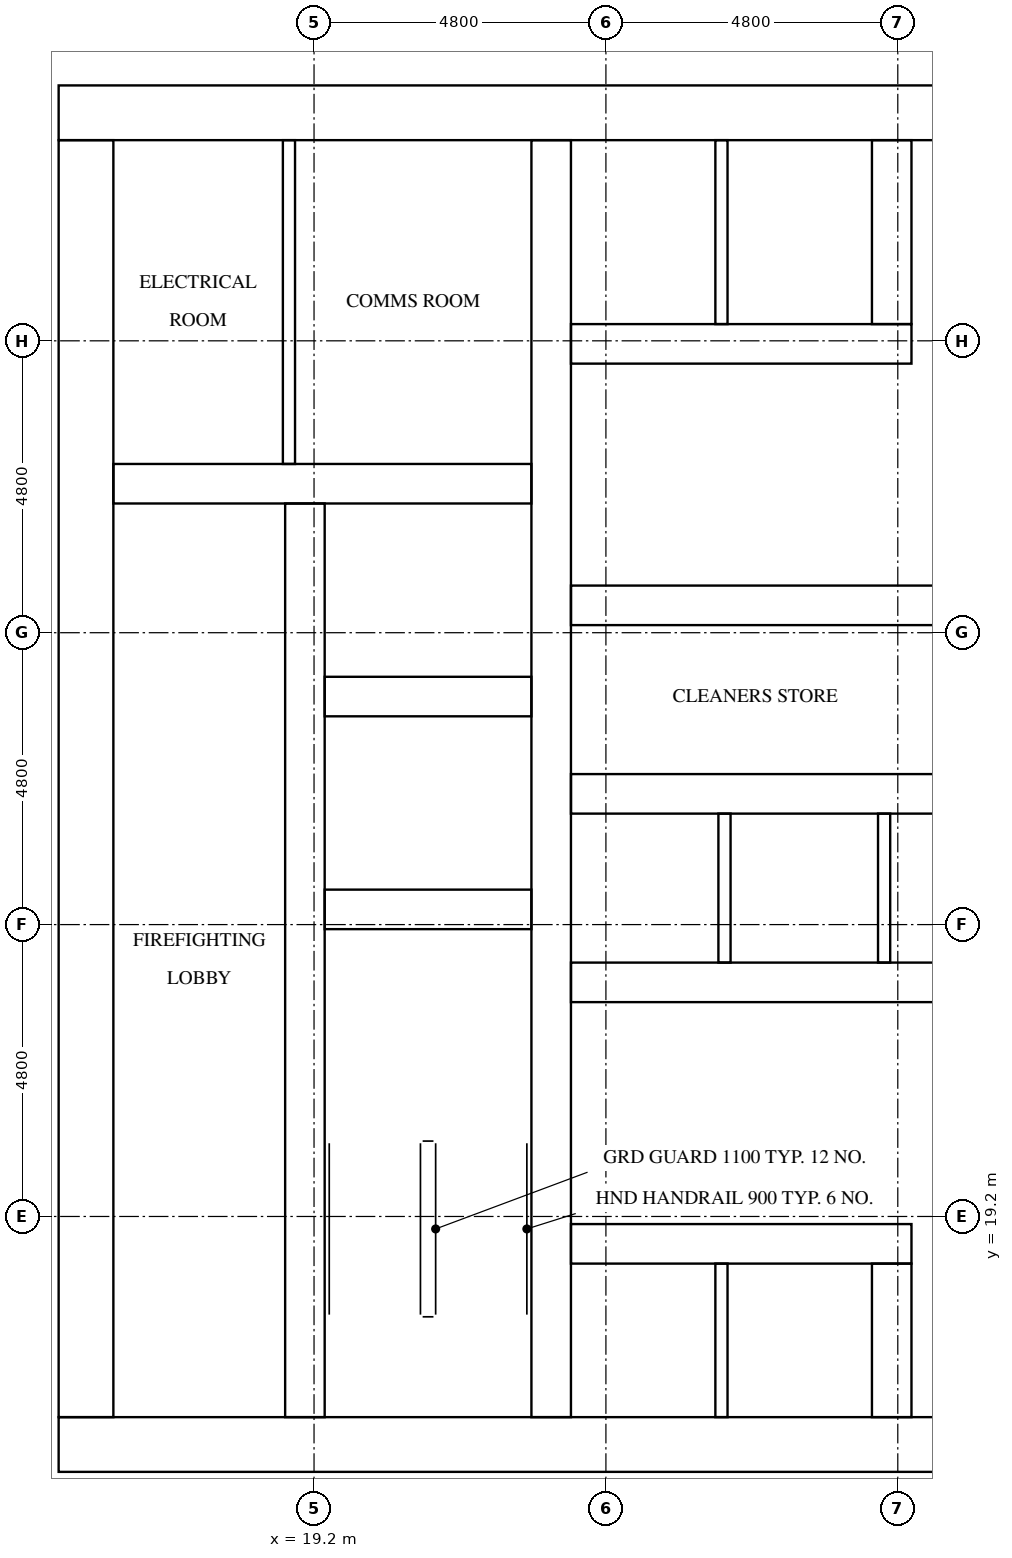
"""IFC4 building model, lengths in metres.
Left out: names, types, materials, properties, quantities, classifications, styles, units other than length and angle.
Written with IfcOpenShell. Run it as: python <this file> out.ifc"""

import sys

from ifc_helpers import new_model, si_unit, direction, frame, frame_2d, origin, place, context, subcontext, project, spatial, rectangle, extrude, element, fill, save


model = new_model("IFC4")
c1 = context("Model", 3, precision=1e-05, world=origin(), true_north=direction((0.0, 1.0)))
c2 = subcontext(c1, "Body", "Model", "MODEL_VIEW")
j1 = project(units=[si_unit("LENGTHUNIT", "METRE"), si_unit("PLANEANGLEUNIT", "RADIAN")], contexts=[c1])
p1 = place(None, origin())
s1 = spatial("IfcSite", under=j1, at=p1, CompositionType="ELEMENT")
p2 = place(p1, origin())
s2 = spatial("IfcBuilding", under=s1, at=p2, CompositionType="ELEMENT")
p3 = place(p2, frame((0.0, 0.0, 76.8)))
s3 = spatial("IfcBuildingStorey", under=s2, at=p3, CompositionType="ELEMENT", Elevation=76.8)
p4 = place(p3, frame((15.0, 15.45, 0.0), z_axis=(0.0, 0.0, 1.0), x_axis=(1.0, 0.0, 0.0)))
e1 = element("IfcWall", 1, at=p4, inside=s3, PredefinedType="SHEAR", context=c2, shape_type="SweptSolid", body=[
    extrude(rectangle(XDim=32.4, YDim=0.9, at=frame_2d((16.2, 0.0))), origin(), (0.0, 0.0, 1.0), 3.2),
])
p5 = place(p4, frame((15.3, 0.0, 0.0)))
e2 = element("IfcOpeningElement", 2, at=p5, cuts=e1, PredefinedType="OPENING", context=c2, shape_type="SweptSolid", body=[
    extrude(rectangle(XDim=1.8, YDim=2.1, at=frame_2d((0.9, 1.05))), frame((0.0, 0.46, 0.0), z_axis=(0.0, -1.0, 0.0), x_axis=(1.0, 0.0, 0.0)), (0.0, 0.0, 1.0), 0.92),
])
p6 = place(p3, frame((15.0, 37.35, 0.0), z_axis=(0.0, 0.0, 1.0), x_axis=(1.0, 0.0, 0.0)))
e3 = element("IfcWall", 3, at=p6, inside=s3, PredefinedType="SHEAR", context=c2, shape_type="SweptSolid", body=[
    extrude(rectangle(XDim=32.4, YDim=0.9, at=frame_2d((16.2, 0.0))), origin(), (0.0, 0.0, 1.0), 3.2),
])
p7 = place(p6, frame((15.3, 0.0, 0.0)))
e4 = element("IfcOpeningElement", 4, at=p7, cuts=e3, PredefinedType="OPENING", context=c2, shape_type="SweptSolid", body=[
    extrude(rectangle(XDim=1.8, YDim=2.1, at=frame_2d((0.9, 1.05))), frame((0.0, 0.46, 0.0), z_axis=(0.0, -1.0, 0.0), x_axis=(1.0, 0.0, 0.0)), (0.0, 0.0, 1.0), 0.92),
])
p8 = place(p6, frame((1.794, 0.0, 0.0)))
e5 = element("IfcOpeningElement", 5, at=p8, cuts=e3, PredefinedType="OPENING", context=c2, shape_type="SweptSolid", body=[
    extrude(rectangle(XDim=1.0, YDim=2.1, at=frame_2d((0.5, 1.05))), frame((0.0, 0.46, 0.0), z_axis=(0.0, -1.0, 0.0), x_axis=(1.0, 0.0, 0.0)), (0.0, 0.0, 1.0), 0.92),
])
p9 = place(p6, frame((5.331, 0.0, 0.0)))
e6 = element("IfcOpeningElement", 6, at=p9, cuts=e3, PredefinedType="OPENING", context=c2, shape_type="SweptSolid", body=[
    extrude(rectangle(XDim=1.0, YDim=2.1, at=frame_2d((0.5, 1.05))), frame((0.0, 0.46, 0.0), z_axis=(0.0, -1.0, 0.0), x_axis=(1.0, 0.0, 0.0)), (0.0, 0.0, 1.0), 0.92),
])
p10 = place(p3, frame((15.45, 15.9, 0.0), z_axis=(0.0, 0.0, 1.0), x_axis=(0.0, 1.0, 0.0)))
e7 = element("IfcWall", 7, at=p10, inside=s3, PredefinedType="SHEAR", context=c2, shape_type="SweptSolid", body=[
    extrude(rectangle(XDim=21.0, YDim=0.9, at=frame_2d((10.5, 0.0))), origin(), (0.0, 0.0, 1.0), 3.2),
])
p11 = place(p10, frame((4.86, 0.0, 0.0)))
e8 = element("IfcOpeningElement", 8, at=p11, cuts=e7, PredefinedType="OPENING", context=c2, shape_type="SweptSolid", body=[
    extrude(rectangle(XDim=1.2, YDim=2.1, at=frame_2d((0.6, 1.05))), frame((0.0, 0.46, 0.0), z_axis=(0.0, -1.0, 0.0), x_axis=(1.0, 0.0, 0.0)), (0.0, 0.0, 1.0), 0.92),
])
p12 = place(p3, frame((19.05, 15.9, 0.0), z_axis=(0.0, 0.0, 1.0), x_axis=(0.0, 1.0, 0.0)))
e9 = element("IfcWall", 9, at=p12, inside=s3, PredefinedType="SHEAR", context=c2, shape_type="SweptSolid", body=[
    extrude(rectangle(XDim=15.025, YDim=0.65, at=frame_2d((7.513, 0.0))), origin(), (0.0, 0.0, 1.0), 3.2),
])
p13 = place(p12, frame((9.55, 0.0, 0.0)))
e10 = element("IfcOpeningElement", 10, at=p13, cuts=e9, PredefinedType="OPENING", context=c2, shape_type="SweptSolid", body=[
    extrude(rectangle(XDim=1.1, YDim=2.1, at=frame_2d((0.55, 1.05))), frame((0.0, 0.335, 0.0), z_axis=(0.0, -1.0, 0.0), x_axis=(1.0, 0.0, 0.0)), (0.0, 0.0, 1.0), 0.67),
])
p14 = place(p12, frame((13.05, 0.0, 0.0)))
e11 = element("IfcOpeningElement", 11, at=p14, cuts=e9, PredefinedType="OPENING", context=c2, shape_type="SweptSolid", body=[
    extrude(rectangle(XDim=1.1, YDim=2.1, at=frame_2d((0.55, 1.05))), frame((0.0, 0.335, 0.0), z_axis=(0.0, -1.0, 0.0), x_axis=(1.0, 0.0, 0.0)), (0.0, 0.0, 1.0), 0.67),
])
p15 = place(p12, frame((0.3, 0.0, 0.0)))
e12 = element("IfcOpeningElement", 12, at=p15, cuts=e9, PredefinedType="OPENING", context=c2, shape_type="SweptSolid", body=[
    extrude(rectangle(XDim=1.2, YDim=2.1, at=frame_2d((0.6, 1.05))), frame((0.0, 0.335, 0.0), z_axis=(0.0, -1.0, 0.0), x_axis=(1.0, 0.0, 0.0)), (0.0, 0.0, 1.0), 0.67),
])
p16 = place(p3, frame((23.1, 15.9, 0.0), z_axis=(0.0, 0.0, 1.0), x_axis=(0.0, 1.0, 0.0)))
e13 = element("IfcWall", 13, at=p16, inside=s3, PredefinedType="SHEAR", context=c2, shape_type="SweptSolid", body=[
    extrude(rectangle(XDim=21.0, YDim=0.65, at=frame_2d((10.5, 0.0))), origin(), (0.0, 0.0, 1.0), 3.2),
])
for number, where, z_axis, x_axis in (
    (14, (19.375, 24.25, 0.0), (0.0, 0.0, 1.0), (1.0, 0.0, 0.0)),
    (15, (19.375, 27.75, 0.0), (0.0, 0.0, 1.0), (1.0, 0.0, 0.0)),
):
    element("IfcWall", number, at=place(p3, frame(where, z_axis=z_axis, x_axis=x_axis)), inside=s3, PredefinedType="SHEAR", context=c2, shape_type="SweptSolid", body=[
        extrude(rectangle(XDim=3.4, YDim=0.65, at=frame_2d((1.7, 0.0))), origin(), (0.0, 0.0, 1.0), 3.2),
    ])
p17 = place(p3, frame((15.9, 31.25, 0.0), z_axis=(0.0, 0.0, 1.0), x_axis=(1.0, 0.0, 0.0)))
e16 = element("IfcWall", 16, at=p17, inside=s3, PredefinedType="SHEAR", context=c2, shape_type="SweptSolid", body=[
    extrude(rectangle(XDim=6.875, YDim=0.65, at=frame_2d((3.438, 0.0))), origin(), (0.0, 0.0, 1.0), 3.2),
])
p18 = place(p3, frame((23.425, 18.75, 0.0), z_axis=(0.0, 0.0, 1.0), x_axis=(1.0, 0.0, 0.0)))
e17 = element("IfcWall", 17, at=p18, inside=s3, PredefinedType="SHEAR", context=c2, shape_type="SweptSolid", body=[
    extrude(rectangle(XDim=5.6, YDim=0.65, at=frame_2d((2.8, 0.0))), origin(), (0.0, 0.0, 1.0), 3.2),
])
p19 = place(p18, frame((0.637, 0.0, 0.0)))
e18 = element("IfcOpeningElement", 18, at=p19, cuts=e17, PredefinedType="OPENING", context=c2, shape_type="SweptSolid", body=[
    extrude(rectangle(XDim=1.1, YDim=2.1, at=frame_2d((0.55, 1.05))), frame((0.0, 0.335, 0.0), z_axis=(0.0, -1.0, 0.0), x_axis=(1.0, 0.0, 0.0)), (0.0, 0.0, 1.0), 0.67),
])
p20 = place(p18, frame((3.212, 0.0, 0.0)))
e19 = element("IfcOpeningElement", 19, at=p20, cuts=e17, PredefinedType="OPENING", context=c2, shape_type="SweptSolid", body=[
    extrude(rectangle(XDim=1.1, YDim=2.1, at=frame_2d((0.55, 1.05))), frame((0.0, 0.335, 0.0), z_axis=(0.0, -1.0, 0.0), x_axis=(1.0, 0.0, 0.0)), (0.0, 0.0, 1.0), 0.67),
])
p21 = place(p3, frame((23.425, 23.05, 0.0), z_axis=(0.0, 0.0, 1.0), x_axis=(1.0, 0.0, 0.0)))
e20 = element("IfcWall", 20, at=p21, inside=s3, PredefinedType="SHEAR", context=c2, shape_type="SweptSolid", body=[
    extrude(rectangle(XDim=15.55, YDim=0.65, at=frame_2d((7.775, 0.0))), origin(), (0.0, 0.0, 1.0), 3.2),
])
p22 = place(p21, frame((0.663, 0.0, 0.0)))
e21 = element("IfcOpeningElement", 21, at=p22, cuts=e20, PredefinedType="OPENING", context=c2, shape_type="SweptSolid", body=[
    extrude(rectangle(XDim=1.1, YDim=2.1, at=frame_2d((0.55, 1.05))), frame((0.0, 0.335, 0.0), z_axis=(0.0, -1.0, 0.0), x_axis=(1.0, 0.0, 0.0)), (0.0, 0.0, 1.0), 0.67),
])
p23 = place(p21, frame((3.288, 0.0, 0.0)))
e22 = element("IfcOpeningElement", 22, at=p23, cuts=e20, PredefinedType="OPENING", context=c2, shape_type="SweptSolid", body=[
    extrude(rectangle(XDim=1.1, YDim=2.1, at=frame_2d((0.55, 1.05))), frame((0.0, 0.335, 0.0), z_axis=(0.0, -1.0, 0.0), x_axis=(1.0, 0.0, 0.0)), (0.0, 0.0, 1.0), 0.67),
])
p24 = place(p21, frame((10.809, 0.0, 0.0)))
e23 = element("IfcOpeningElement", 23, at=p24, cuts=e20, PredefinedType="OPENING", context=c2, shape_type="SweptSolid", body=[
    extrude(rectangle(XDim=1.0, YDim=2.1, at=frame_2d((0.5, 1.05))), frame((0.0, 0.335, 0.0), z_axis=(0.0, -1.0, 0.0), x_axis=(1.0, 0.0, 0.0)), (0.0, 0.0, 1.0), 0.67),
])
p25 = place(p21, frame((13.434, 0.0, 0.0)))
e24 = element("IfcOpeningElement", 24, at=p25, cuts=e20, PredefinedType="OPENING", context=c2, shape_type="SweptSolid", body=[
    extrude(rectangle(XDim=1.0, YDim=2.1, at=frame_2d((0.5, 1.05))), frame((0.0, 0.335, 0.0), z_axis=(0.0, -1.0, 0.0), x_axis=(1.0, 0.0, 0.0)), (0.0, 0.0, 1.0), 0.67),
])
p26 = place(p3, frame((23.425, 26.15, 0.0), z_axis=(0.0, 0.0, 1.0), x_axis=(1.0, 0.0, 0.0)))
e25 = element("IfcWall", 25, at=p26, inside=s3, PredefinedType="SHEAR", context=c2, shape_type="SweptSolid", body=[
    extrude(rectangle(XDim=15.55, YDim=0.65, at=frame_2d((7.775, 0.0))), origin(), (0.0, 0.0, 1.0), 3.2),
])
p27 = place(p3, frame((23.425, 29.25, 0.0), z_axis=(0.0, 0.0, 1.0), x_axis=(1.0, 0.0, 0.0)))
e26 = element("IfcWall", 26, at=p27, inside=s3, PredefinedType="SHEAR", context=c2, shape_type="SweptSolid", body=[
    extrude(rectangle(XDim=15.55, YDim=0.65, at=frame_2d((7.775, 0.0))), origin(), (0.0, 0.0, 1.0), 3.2),
])
p28 = place(p27, frame((2.508, 0.0, 0.0)))
e27 = element("IfcOpeningElement", 27, at=p28, cuts=e26, PredefinedType="OPENING", context=c2, shape_type="SweptSolid", body=[
    extrude(rectangle(XDim=1.0, YDim=2.1, at=frame_2d((0.5, 1.05))), frame((0.0, 0.335, 0.0), z_axis=(0.0, -1.0, 0.0), x_axis=(1.0, 0.0, 0.0)), (0.0, 0.0, 1.0), 0.67),
])
p29 = place(p27, frame((7.275, 0.0, 0.0)))
e28 = element("IfcOpeningElement", 28, at=p29, cuts=e26, PredefinedType="OPENING", context=c2, shape_type="SweptSolid", body=[
    extrude(rectangle(XDim=1.0, YDim=2.1, at=frame_2d((0.5, 1.05))), frame((0.0, 0.335, 0.0), z_axis=(0.0, -1.0, 0.0), x_axis=(1.0, 0.0, 0.0)), (0.0, 0.0, 1.0), 0.67),
])
p30 = place(p27, frame((12.042, 0.0, 0.0)))
e29 = element("IfcOpeningElement", 29, at=p30, cuts=e26, PredefinedType="OPENING", context=c2, shape_type="SweptSolid", body=[
    extrude(rectangle(XDim=1.0, YDim=2.1, at=frame_2d((0.5, 1.05))), frame((0.0, 0.335, 0.0), z_axis=(0.0, -1.0, 0.0), x_axis=(1.0, 0.0, 0.0)), (0.0, 0.0, 1.0), 0.67),
])
p31 = place(p3, frame((23.425, 33.55, 0.0), z_axis=(0.0, 0.0, 1.0), x_axis=(1.0, 0.0, 0.0)))
e30 = element("IfcWall", 30, at=p31, inside=s3, PredefinedType="SHEAR", context=c2, shape_type="SweptSolid", body=[
    extrude(rectangle(XDim=5.6, YDim=0.65, at=frame_2d((2.8, 0.0))), origin(), (0.0, 0.0, 1.0), 3.2),
])
p32 = place(p3, frame((28.7, 15.9, 0.0), z_axis=(0.0, 0.0, 1.0), x_axis=(0.0, 1.0, 0.0)))
e31 = element("IfcWall", 31, at=p32, inside=s3, PredefinedType="SHEAR", context=c2, shape_type="SweptSolid", body=[
    extrude(rectangle(XDim=2.525, YDim=0.65, at=frame_2d((1.263, 0.0))), origin(), (0.0, 0.0, 1.0), 3.2),
])
p33 = place(p3, frame((28.7, 33.875, 0.0), z_axis=(0.0, 0.0, 1.0), x_axis=(0.0, 1.0, 0.0)))
e32 = element("IfcWall", 32, at=p33, inside=s3, PredefinedType="SHEAR", context=c2, shape_type="SweptSolid", body=[
    extrude(rectangle(XDim=3.025, YDim=0.65, at=frame_2d((1.512, 0.0))), origin(), (0.0, 0.0, 1.0), 3.2),
])
for number, where, z_axis, x_axis in (
    (33, (25.95, 23.375, 0.0), (0.0, 0.0, 1.0), (0.0, 1.0, 0.0)),
    (34, (28.575, 23.375, 0.0), (0.0, 0.0, 1.0), (0.0, 1.0, 0.0)),
):
    element("IfcWall", number, at=place(p3, frame(where, z_axis=z_axis, x_axis=x_axis)), inside=s3, PredefinedType="SOLIDWALL", context=c2, shape_type="SweptSolid", body=[
        extrude(rectangle(XDim=2.45, YDim=0.2, at=frame_2d((1.225, 0.0))), origin(), (0.0, 0.0, 1.0), 3.2),
    ])
p34 = place(p3, frame((25.9, 15.9, 0.0), z_axis=(0.0, 0.0, 1.0), x_axis=(0.0, 1.0, 0.0)))
e35 = element("IfcWall", 35, at=p34, inside=s3, PredefinedType="SOLIDWALL", context=c2, shape_type="SweptSolid", body=[
    extrude(rectangle(XDim=2.525, YDim=0.2, at=frame_2d((1.263, 0.0))), origin(), (0.0, 0.0, 1.0), 3.2),
])
p35 = place(p3, frame((25.9, 33.875, 0.0), z_axis=(0.0, 0.0, 1.0), x_axis=(0.0, 1.0, 0.0)))
e36 = element("IfcWall", 36, at=p35, inside=s3, PredefinedType="SOLIDWALL", context=c2, shape_type="SweptSolid", body=[
    extrude(rectangle(XDim=3.025, YDim=0.2, at=frame_2d((1.512, 0.0))), origin(), (0.0, 0.0, 1.0), 3.2),
])
p36 = place(p3, frame((18.788, 31.575, 0.0), z_axis=(0.0, 0.0, 1.0), x_axis=(0.0, 1.0, 0.0)))
e37 = element("IfcWall", 37, at=p36, inside=s3, PredefinedType="PARTITIONING", context=c2, shape_type="SweptSolid", body=[
    extrude(rectangle(XDim=5.325, YDim=0.2, at=frame_2d((2.663, 0.0))), origin(), (0.0, 0.0, 1.0), 3.2),
])
p37 = place(p19, origin())
e38 = element("IfcDoor", 38, at=p37, inside=s3, OperationType="DOUBLE_DOOR_SLIDING", PredefinedType="DOOR", context=c2, shape_type="SweptSolid", body=[
    extrude(rectangle(XDim=1.1, YDim=2.1, at=frame_2d((0.55, 1.05))), frame((0.0, 0.025, 0.0), z_axis=(0.0, -1.0, 0.0), x_axis=(1.0, 0.0, 0.0)), (0.0, 0.0, 1.0), 0.05),
])
fill(e18, e38)
p38 = place(p20, origin())
e39 = element("IfcDoor", 39, at=p38, inside=s3, OperationType="DOUBLE_DOOR_SLIDING", PredefinedType="DOOR", context=c2, shape_type="SweptSolid", body=[
    extrude(rectangle(XDim=1.1, YDim=2.1, at=frame_2d((0.55, 1.05))), frame((0.0, 0.025, 0.0), z_axis=(0.0, -1.0, 0.0), x_axis=(1.0, 0.0, 0.0)), (0.0, 0.0, 1.0), 0.05),
])
fill(e19, e39)
p39 = place(p22, origin())
e40 = element("IfcDoor", 40, at=p39, inside=s3, OperationType="DOUBLE_DOOR_SLIDING", PredefinedType="DOOR", context=c2, shape_type="SweptSolid", body=[
    extrude(rectangle(XDim=1.1, YDim=2.1, at=frame_2d((0.55, 1.05))), frame((0.0, 0.025, 0.0), z_axis=(0.0, -1.0, 0.0), x_axis=(1.0, 0.0, 0.0)), (0.0, 0.0, 1.0), 0.05),
])
fill(e21, e40)
p40 = place(p23, origin())
e41 = element("IfcDoor", 41, at=p40, inside=s3, OperationType="DOUBLE_DOOR_SLIDING", PredefinedType="DOOR", context=c2, shape_type="SweptSolid", body=[
    extrude(rectangle(XDim=1.1, YDim=2.1, at=frame_2d((0.55, 1.05))), frame((0.0, 0.025, 0.0), z_axis=(0.0, -1.0, 0.0), x_axis=(1.0, 0.0, 0.0)), (0.0, 0.0, 1.0), 0.05),
])
fill(e22, e41)
p41 = place(p13, origin())
e42 = element("IfcDoor", 42, at=p41, inside=s3, OperationType="DOUBLE_DOOR_SLIDING", PredefinedType="DOOR", context=c2, shape_type="SweptSolid", body=[
    extrude(rectangle(XDim=1.1, YDim=2.1, at=frame_2d((0.55, 1.05))), frame((0.0, 0.025, 0.0), z_axis=(0.0, -1.0, 0.0), x_axis=(1.0, 0.0, 0.0)), (0.0, 0.0, 1.0), 0.05),
])
fill(e10, e42)
p42 = place(p14, origin())
e43 = element("IfcDoor", 43, at=p42, inside=s3, OperationType="DOUBLE_DOOR_SLIDING", PredefinedType="DOOR", context=c2, shape_type="SweptSolid", body=[
    extrude(rectangle(XDim=1.1, YDim=2.1, at=frame_2d((0.55, 1.05))), frame((0.0, 0.025, 0.0), z_axis=(0.0, -1.0, 0.0), x_axis=(1.0, 0.0, 0.0)), (0.0, 0.0, 1.0), 0.05),
])
fill(e11, e43)
p43 = place(p15, frame((1.2, 0.0, 0.0), z_axis=(0.0, 0.0, 1.0), x_axis=(-1.0, 0.0, 0.0)))
e44 = element("IfcDoor", 44, at=p43, inside=s3, OperationType="SINGLE_SWING_LEFT", PredefinedType="DOOR", context=c2, shape_type="SweptSolid", body=[
    extrude(rectangle(XDim=1.2, YDim=2.1, at=frame_2d((0.6, 1.05))), frame((0.0, 0.025, 0.0), z_axis=(0.0, -1.0, 0.0), x_axis=(1.0, 0.0, 0.0)), (0.0, 0.0, 1.0), 0.05),
])
fill(e12, e44)
p44 = place(p11, frame((1.2, 0.0, 0.0), z_axis=(0.0, 0.0, 1.0), x_axis=(-1.0, 0.0, 0.0)))
e45 = element("IfcDoor", 45, at=p44, inside=s3, OperationType="SINGLE_SWING_RIGHT", PredefinedType="DOOR", context=c2, shape_type="SweptSolid", body=[
    extrude(rectangle(XDim=1.2, YDim=2.1, at=frame_2d((0.6, 1.05))), frame((0.0, 0.025, 0.0), z_axis=(0.0, -1.0, 0.0), x_axis=(1.0, 0.0, 0.0)), (0.0, 0.0, 1.0), 0.05),
])
fill(e8, e45)
p45 = place(p8, origin())
e46 = element("IfcDoor", 46, at=p45, inside=s3, OperationType="SINGLE_SWING_RIGHT", PredefinedType="DOOR", context=c2, shape_type="SweptSolid", body=[
    extrude(rectangle(XDim=1.0, YDim=2.1, at=frame_2d((0.5, 1.05))), frame((0.0, 0.025, 0.0), z_axis=(0.0, -1.0, 0.0), x_axis=(1.0, 0.0, 0.0)), (0.0, 0.0, 1.0), 0.05),
])
fill(e5, e46)
p46 = place(p9, origin())
e47 = element("IfcDoor", 47, at=p46, inside=s3, OperationType="SINGLE_SWING_LEFT", PredefinedType="DOOR", context=c2, shape_type="SweptSolid", body=[
    extrude(rectangle(XDim=1.0, YDim=2.1, at=frame_2d((0.5, 1.05))), frame((0.0, 0.025, 0.0), z_axis=(0.0, -1.0, 0.0), x_axis=(1.0, 0.0, 0.0)), (0.0, 0.0, 1.0), 0.05),
])
fill(e6, e47)
p47 = place(p28, origin())
e48 = element("IfcDoor", 48, at=p47, inside=s3, OperationType="SINGLE_SWING_RIGHT", PredefinedType="DOOR", context=c2, shape_type="SweptSolid", body=[
    extrude(rectangle(XDim=1.0, YDim=2.1, at=frame_2d((0.5, 1.05))), frame((0.0, 0.025, 0.0), z_axis=(0.0, -1.0, 0.0), x_axis=(1.0, 0.0, 0.0)), (0.0, 0.0, 1.0), 0.05),
])
fill(e27, e48)
save(model, sys.argv[1])
